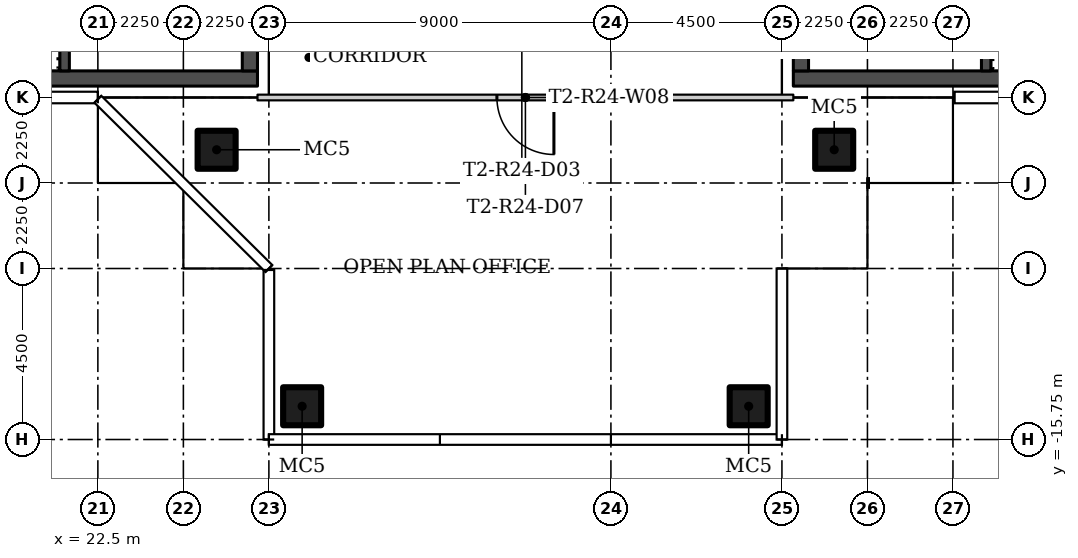
"""IFC4 building model, lengths in metres.
Left out: names, types, materials, properties, quantities, classifications, styles, units other than length and angle.
Written with IfcOpenShell. Run it as: python <this file> out.ifc"""

import sys

from ifc_helpers import new_model, si_unit, direction, frame, frame_2d, origin, origin_2d, place, context, subcontext, project, spatial, rectangle, hollow_rectangle, extrude, element, fill, save


model = new_model("IFC4")
c1 = context("Model", 3, precision=1e-05, world=origin(), true_north=direction((0.0, 1.0)))
c2 = subcontext(c1, "Body", "Model", "MODEL_VIEW")
j1 = project(units=[si_unit("LENGTHUNIT", "METRE"), si_unit("PLANEANGLEUNIT", "RADIAN")], contexts=[c1])
p1 = place(None, origin())
s1 = spatial("IfcSite", under=j1, at=p1, CompositionType="ELEMENT")
p2 = place(p1, origin())
s2 = spatial("IfcBuilding", under=s1, at=p2, CompositionType="ELEMENT")
p3 = place(p2, frame((0.0, 0.0, 217.8)))
s3 = spatial("IfcBuildingStorey", under=s2, at=p3, CompositionType="ELEMENT", Elevation=217.8)
for number, where in (
    (1, (25.625, -8.125, 0.0)),
    (2, (41.875, -8.125, 0.0)),
    (3, (39.625, -14.875, 0.0)),
    (4, (27.875, -14.875, 0.0)),
):
    element("IfcColumn", number, at=place(p3, frame(where)), inside=s3, PredefinedType="COLUMN", context=c2, shape_type="SweptSolid", body=[
        extrude(hollow_rectangle(XDim=1.0, YDim=1.0, WallThickness=0.04, at=origin_2d()), origin(), (0.0, 0.0, 1.0), 3.55),
    ])
p4 = place(p3, frame((40.8, -6.75, 0.0), z_axis=(0.0, 0.0, 1.0), x_axis=(-1.0, 0.0, 0.0)))
e5 = element("IfcWall", 5, at=p4, inside=s3, PredefinedType="PARTITIONING", context=c2, shape_type="SweptSolid", body=[
    extrude(rectangle(XDim=14.1, YDim=0.15, at=frame_2d((7.05, 0.0))), origin(), (0.0, 0.0, 1.0), 3.55),
])
p5 = place(p4, frame((6.3, 0.0, 0.0)))
e6 = element("IfcOpeningElement", 6, at=p5, cuts=e5, PredefinedType="OPENING", context=c2, shape_type="SweptSolid", body=[
    extrude(rectangle(XDim=1.5, YDim=2.1, at=frame_2d((0.75, 1.05))), frame((0.0, 0.085, 0.0), z_axis=(0.0, -1.0, 0.0), x_axis=(1.0, 0.0, 0.0)), (0.0, 0.0, 1.0), 0.17),
])
p6 = place(p3, frame((13.8, -6.25, 0.0)))
e7 = element("IfcWall", 7, at=p6, inside=s3, PredefinedType="SHEAR", context=c2, shape_type="SweptSolid", body=[
    extrude(rectangle(XDim=12.9, YDim=0.4, at=frame_2d((6.45, 0.0))), origin(), (0.0, 0.0, 1.0), 3.55),
])
p7 = place(p3, frame((26.5, 6.05, 0.0), z_axis=(0.0, 0.0, 1.0), x_axis=(0.0, -1.0, 0.0)))
e8 = element("IfcWall", 8, at=p7, inside=s3, PredefinedType="SHEAR", context=c2, shape_type="SweptSolid", body=[
    extrude(rectangle(XDim=12.1, YDim=0.4, at=frame_2d((6.05, 0.0))), origin(), (0.0, 0.0, 1.0), 3.55),
])
p8 = place(p7, frame((10.1, 0.0, 0.0)))
e9 = element("IfcOpeningElement", 9, at=p8, cuts=e8, PredefinedType="OPENING", context=c2, shape_type="SweptSolid", body=[
    extrude(rectangle(XDim=1.2, YDim=2.1, at=frame_2d((0.6, 1.05))), frame((0.0, 0.21, 0.0), z_axis=(0.0, -1.0, 0.0), x_axis=(1.0, 0.0, 0.0)), (0.0, 0.0, 1.0), 0.42),
])
p9 = place(p7, frame((3.9, 0.0, 0.0)))
e10 = element("IfcOpeningElement", 10, at=p9, cuts=e8, PredefinedType="OPENING", context=c2, shape_type="SweptSolid", body=[
    extrude(rectangle(XDim=1.8, YDim=2.4, at=frame_2d((0.9, 1.2))), frame((0.0, 0.21, 0.0), z_axis=(0.0, -1.0, 0.0), x_axis=(1.0, 0.0, 0.0)), (0.0, 0.0, 1.0), 0.42),
])
p10 = place(p3, frame((21.625, -6.05, 0.0), z_axis=(0.0, 0.0, 1.0), x_axis=(0.0, 1.0, 0.0)))
e11 = element("IfcWall", 11, at=p10, inside=s3, PredefinedType="SHEAR", context=c2, shape_type="SweptSolid", body=[
    extrude(rectangle(XDim=2.55, YDim=0.25, at=frame_2d((1.275, 0.0))), origin(), (0.0, 0.0, 1.0), 3.55),
])
p11 = place(p3, frame((53.7, -6.25, 0.0), z_axis=(0.0, 0.0, 1.0), x_axis=(-1.0, 0.0, 0.0)))
e12 = element("IfcWall", 12, at=p11, inside=s3, PredefinedType="SHEAR", context=c2, shape_type="SweptSolid", body=[
    extrude(rectangle(XDim=12.9, YDim=0.4, at=frame_2d((6.45, 0.0))), origin(), (0.0, 0.0, 1.0), 3.55),
])
p12 = place(p3, frame((41.0, -6.05, 0.0), z_axis=(0.0, 0.0, 1.0), x_axis=(0.0, 1.0, 0.0)))
e13 = element("IfcWall", 13, at=p12, inside=s3, PredefinedType="SHEAR", context=c2, shape_type="SweptSolid", body=[
    extrude(rectangle(XDim=12.1, YDim=0.4, at=frame_2d((6.05, 0.0))), origin(), (0.0, 0.0, 1.0), 3.55),
])
p13 = place(p12, frame((0.8, 0.0, 0.0)))
e14 = element("IfcOpeningElement", 14, at=p13, cuts=e13, PredefinedType="OPENING", context=c2, shape_type="SweptSolid", body=[
    extrude(rectangle(XDim=1.2, YDim=2.1, at=frame_2d((0.6, 1.05))), frame((0.0, 0.21, 0.0), z_axis=(0.0, -1.0, 0.0), x_axis=(1.0, 0.0, 0.0)), (0.0, 0.0, 1.0), 0.42),
])
p14 = place(p12, frame((6.4, 0.0, 0.0)))
e15 = element("IfcOpeningElement", 15, at=p14, cuts=e13, PredefinedType="OPENING", context=c2, shape_type="SweptSolid", body=[
    extrude(rectangle(XDim=1.8, YDim=2.4, at=frame_2d((0.9, 1.2))), frame((0.0, 0.21, 0.0), z_axis=(0.0, -1.0, 0.0), x_axis=(1.0, 0.0, 0.0)), (0.0, 0.0, 1.0), 0.42),
])
p15 = place(p3, frame((45.875, -6.05, 0.0), z_axis=(0.0, 0.0, 1.0), x_axis=(0.0, 1.0, 0.0)))
e16 = element("IfcWall", 16, at=p15, inside=s3, PredefinedType="SHEAR", context=c2, shape_type="SweptSolid", body=[
    extrude(rectangle(XDim=2.55, YDim=0.25, at=frame_2d((1.275, 0.0))), origin(), (0.0, 0.0, 1.0), 3.55),
])
p16 = place(p5, origin())
e17 = element("IfcDoor", 17, at=p16, inside=s3, OperationType="DOUBLE_DOOR_SINGLE_SWING", PredefinedType="DOOR", context=c2, shape_type="SweptSolid", body=[
    extrude(rectangle(XDim=1.5, YDim=2.1, at=frame_2d((0.75, 1.05))), frame((0.0, 0.025, 0.0), z_axis=(0.0, -1.0, 0.0), x_axis=(1.0, 0.0, 0.0)), (0.0, 0.0, 1.0), 0.05),
])
fill(e6, e17)
save(model, sys.argv[1])
